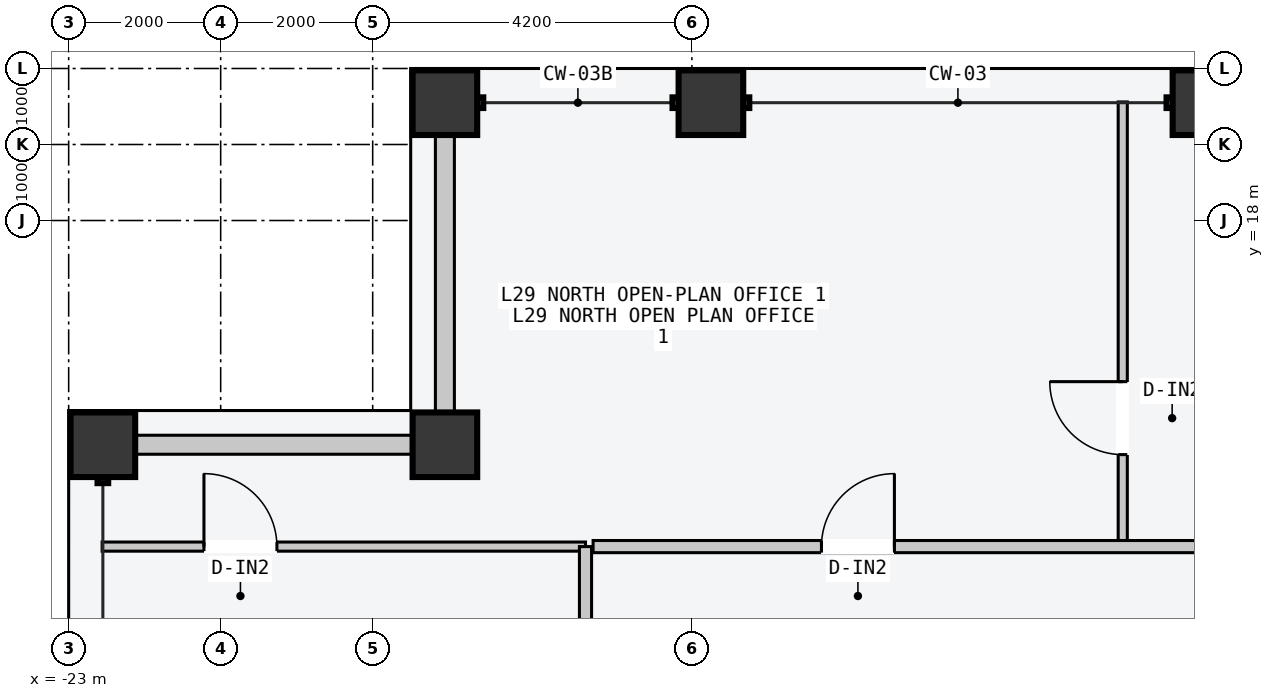
"""IFC4 building model, lengths in metres.
Left out: names, types, materials, properties, quantities, classifications, styles, units other than length and angle.
Written with IfcOpenShell. Run it as: python <this file> out.ifc"""

import sys

from ifc_helpers import new_model, si_unit, direction, frame, frame_2d, origin, origin_2d, place, context, subcontext, project, spatial, rectangle, hollow_rectangle, extrude, element, fill, save


model = new_model("IFC4")
c1 = context("Model", 3, precision=1e-05, world=origin(), true_north=direction((0.0, 1.0)))
c2 = subcontext(c1, "Body", "Model", "MODEL_VIEW")
j1 = project(units=[si_unit("LENGTHUNIT", "METRE"), si_unit("PLANEANGLEUNIT", "RADIAN")], contexts=[c1])
p1 = place(None, origin())
s1 = spatial("IfcSite", under=j1, at=p1, CompositionType="ELEMENT")
p2 = place(p1, origin())
s2 = spatial("IfcBuilding", under=s1, at=p2, CompositionType="ELEMENT")
p3 = place(p2, frame((0.0, 0.0, 113.4)))
s3 = spatial("IfcBuildingStorey", under=s2, at=p3, CompositionType="ELEMENT", Elevation=113.4)
for number, where, z_axis, x_axis in (
    (1, (-18.05, 19.55, 0.0), (0.0, 0.0, 1.0), (1.0, 0.0, 0.0)),
    (2, (-14.55, 19.55, 0.0), (0.0, 0.0, 1.0), (1.0, 0.0, 0.0)),
    (3, (-8.05, 19.55, 0.0), (0.0, 0.0, 1.0), (1.0, 0.0, 0.0)),
    (4, (-22.55, 15.05, 0.0), (0.0, 0.0, 1.0), (0.0, 1.0, 0.0)),
    (5, (-18.05, 15.05, 0.0), (0.0, 0.0, 1.0), (1.0, 0.0, 0.0)),
):
    element("IfcColumn", number, at=place(p3, frame(where, z_axis=z_axis, x_axis=x_axis)), inside=s3, PredefinedType="COLUMN", context=c2, shape_type="SweptSolid", body=[
        extrude(hollow_rectangle(XDim=0.85, YDim=0.85, WallThickness=0.04, at=origin_2d()), origin(), (0.0, 0.0, 1.0), 3.6),
    ])
for number, where, z_axis, x_axis in (
    (6, (-22.115, 15.05, 0.0), (0.0, 0.0, 1.0), (1.0, 0.0, 0.0)),
    (7, (-18.05, 15.485, 0.0), (0.0, 0.0, 1.0), (0.0, 1.0, 0.0)),
):
    element("IfcWall", number, at=place(p3, frame(where, z_axis=z_axis, x_axis=x_axis)), inside=s3, PredefinedType="STANDARD", context=c2, shape_type="SweptSolid", body=[
        extrude(rectangle(XDim=3.63, YDim=0.25, at=frame_2d((1.815, 0.0))), origin(), (0.0, 0.0, 1.0), 2.75),
    ])
p4 = place(p3, frame((-9.131, 13.77, 0.0), z_axis=(0.0, 0.0, 1.0), x_axis=(0.0, 1.0, 0.0)))
e8 = element("IfcWall", 8, at=p4, inside=s3, PredefinedType="PARTITIONING", context=c2, shape_type="SweptSolid", body=[
    extrude(rectangle(XDim=5.79, YDim=0.12, at=frame_2d((2.895, 0.0))), origin(), (0.0, 0.0, 1.0), 3.4),
])
p5 = place(p4, frame((1.15, 0.0, 0.0)))
e9 = element("IfcOpeningElement", 9, at=p5, cuts=e8, PredefinedType="OPENING", context=c2, shape_type="SweptSolid", body=[
    extrude(rectangle(XDim=0.96, YDim=2.18, at=frame_2d((0.48, 1.09))), frame((0.0, 0.07, 0.0), z_axis=(0.0, -1.0, 0.0), x_axis=(1.0, 0.0, 0.0)), (0.0, 0.0, 1.0), 0.14),
])
p6 = place(p3, frame((-16.1, 13.71, 0.0), z_axis=(0.0, 0.0, 1.0), x_axis=(1.0, 0.0, 0.0)))
e10 = element("IfcWall", 10, at=p6, inside=s3, PredefinedType="PARTITIONING", context=c2, shape_type="SweptSolid", body=[
    extrude(rectangle(XDim=32.2, YDim=0.16, at=frame_2d((16.1, 0.0))), origin(), (0.0, 0.0, 1.0), 3.4),
])
p7 = place(p6, frame((3.004, 0.0, 0.0)))
e11 = element("IfcOpeningElement", 11, at=p7, cuts=e10, PredefinedType="OPENING", context=c2, shape_type="SweptSolid", body=[
    extrude(rectangle(XDim=0.96, YDim=2.18, at=frame_2d((0.48, 1.09))), frame((0.0, 0.09, 0.0), z_axis=(0.0, -1.0, 0.0), x_axis=(1.0, 0.0, 0.0)), (0.0, 0.0, 1.0), 0.18),
])
p8 = place(p6, frame((12.208, 0.0, 0.0)))
e12 = element("IfcOpeningElement", 12, at=p8, cuts=e10, PredefinedType="OPENING", context=c2, shape_type="SweptSolid", body=[
    extrude(rectangle(XDim=1.02, YDim=2.2, at=frame_2d((0.51, 1.1))), frame((0.0, 0.09, 0.0), z_axis=(0.0, -1.0, 0.0), x_axis=(1.0, 0.0, 0.0)), (0.0, 0.0, 1.0), 0.18),
])
p9 = place(p6, frame((24.804, 0.0, 0.0)))
e13 = element("IfcOpeningElement", 13, at=p9, cuts=e10, PredefinedType="OPENING", context=c2, shape_type="SweptSolid", body=[
    extrude(rectangle(XDim=1.06, YDim=2.2, at=frame_2d((0.53, 1.1))), frame((0.0, 0.09, 0.0), z_axis=(0.0, -1.0, 0.0), x_axis=(1.0, 0.0, 0.0)), (0.0, 0.0, 1.0), 0.18),
])
p10 = place(p3, frame((-22.56, 13.71, 0.0), z_axis=(0.0, 0.0, 1.0), x_axis=(1.0, 0.0, 0.0)))
e14 = element("IfcWall", 14, at=p10, inside=s3, PredefinedType="PARTITIONING", context=c2, shape_type="SweptSolid", body=[
    extrude(rectangle(XDim=6.36, YDim=0.12, at=frame_2d((3.18, 0.0))), origin(), (0.0, 0.0, 1.0), 3.4),
])
p11 = place(p10, frame((1.34, 0.0, 0.0)))
e15 = element("IfcOpeningElement", 15, at=p11, cuts=e14, PredefinedType="OPENING", context=c2, shape_type="SweptSolid", body=[
    extrude(rectangle(XDim=0.96, YDim=2.18, at=frame_2d((0.48, 1.09))), frame((0.0, 0.07, 0.0), z_axis=(0.0, -1.0, 0.0), x_axis=(1.0, 0.0, 0.0)), (0.0, 0.0, 1.0), 0.14),
])
p12 = place(p3, frame((-16.2, 11.76, 0.0), z_axis=(0.0, 0.0, 1.0), x_axis=(0.0, 1.0, 0.0)))
e16 = element("IfcWall", 16, at=p12, inside=s3, PredefinedType="PARTITIONING", context=c2, shape_type="SweptSolid", body=[
    extrude(rectangle(XDim=1.95, YDim=0.16, at=frame_2d((0.975, 0.0))), origin(), (0.0, 0.0, 1.0), 3.4),
])
p13 = place(p5, origin())
e17 = element("IfcDoor", 17, at=p13, inside=s3, OperationType="SINGLE_SWING_RIGHT", PredefinedType="DOOR", context=c2, shape_type="SweptSolid", body=[
    extrude(rectangle(XDim=0.96, YDim=2.18, at=frame_2d((0.48, 1.09))), frame((0.0, 0.025, 0.0), z_axis=(0.0, -1.0, 0.0), x_axis=(1.0, 0.0, 0.0)), (0.0, 0.0, 1.0), 0.05),
])
fill(e9, e17)
p14 = place(p7, origin())
e18 = element("IfcDoor", 18, at=p14, inside=s3, OperationType="SINGLE_SWING_RIGHT", PredefinedType="DOOR", context=c2, shape_type="SweptSolid", body=[
    extrude(rectangle(XDim=0.96, YDim=2.18, at=frame_2d((0.48, 1.09))), frame((0.0, 0.025, 0.0), z_axis=(0.0, -1.0, 0.0), x_axis=(1.0, 0.0, 0.0)), (0.0, 0.0, 1.0), 0.05),
])
fill(e11, e18)
p15 = place(p11, origin())
e19 = element("IfcDoor", 19, at=p15, inside=s3, OperationType="SINGLE_SWING_LEFT", PredefinedType="DOOR", context=c2, shape_type="SweptSolid", body=[
    extrude(rectangle(XDim=0.96, YDim=2.18, at=frame_2d((0.48, 1.09))), frame((0.0, 0.025, 0.0), z_axis=(0.0, -1.0, 0.0), x_axis=(1.0, 0.0, 0.0)), (0.0, 0.0, 1.0), 0.05),
])
fill(e15, e19)
save(model, sys.argv[1])
